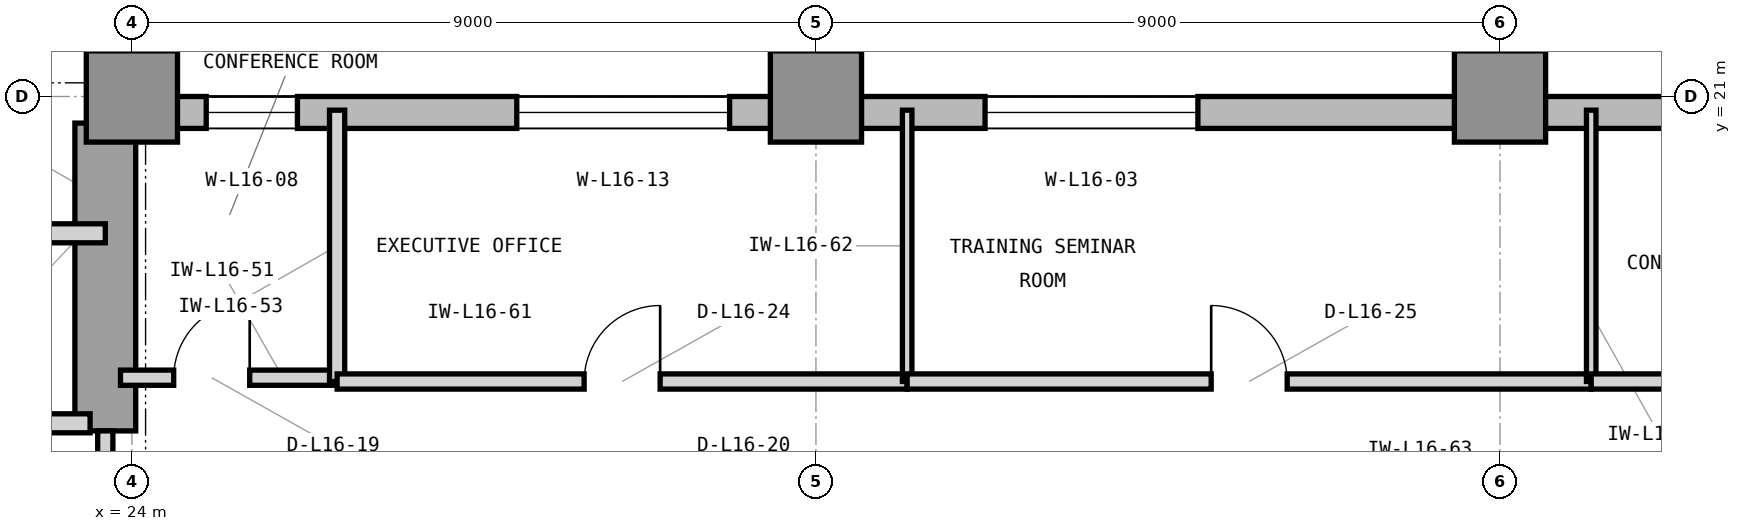
"""IFC4 building model, lengths in metres.
Left out: names, types, materials, properties, quantities, classifications, styles, units other than length and angle.
Written with IfcOpenShell. Run it as: python <this file> out.ifc"""

import sys

from ifc_helpers import new_model, si_unit, direction, frame, frame_2d, origin, origin_2d, place, context, subcontext, project, spatial, rectangle, extrude, element, fill, save


model = new_model("IFC4")
c1 = context("Model", 3, precision=1e-05, world=origin(), true_north=direction((0.0, 1.0)))
c2 = subcontext(c1, "Body", "Model", "MODEL_VIEW")
j1 = project(units=[si_unit("LENGTHUNIT", "METRE"), si_unit("PLANEANGLEUNIT", "RADIAN")], contexts=[c1])
p1 = place(None, origin())
s1 = spatial("IfcSite", under=j1, at=p1, CompositionType="ELEMENT")
p2 = place(p1, origin())
s2 = spatial("IfcBuilding", under=s1, at=p2, CompositionType="ELEMENT")
p3 = place(p2, frame((0.0, 0.0, 72.0)))
s3 = spatial("IfcBuildingStorey", under=s2, at=p3, CompositionType="ELEMENT", Elevation=72.0)
p4 = place(p3, frame((23.65, 16.6, 0.0), z_axis=(0.0, 0.0, 1.0), x_axis=(0.0, 1.0, 0.0)))
e1 = element("IfcWall", 1, at=p4, inside=s3, PredefinedType="SHEAR", context=c2, shape_type="SweptSolid", body=[
    extrude(rectangle(XDim=4.05, YDim=0.8, at=frame_2d((2.025, 0.0))), origin(), (0.0, 0.0, 1.0), 4.2),
])
for number, where, z_axis, x_axis in (
    (2, (24.0, 21.0, 0.0), (0.0, 0.0, 1.0), (1.0, 0.0, 0.0)),
    (3, (33.0, 21.0, 0.0), (0.0, 0.0, 1.0), (1.0, 0.0, 0.0)),
    (4, (42.0, 21.0, 0.0), (0.0, 0.0, 1.0), (1.0, 0.0, 0.0)),
):
    element("IfcColumn", number, at=place(p3, frame(where, z_axis=z_axis, x_axis=x_axis)), inside=s3, PredefinedType="COLUMN", context=c2, shape_type="SweptSolid", body=[
        extrude(rectangle(XDim=1.2, YDim=1.2, at=origin_2d()), origin(), (0.0, 0.0, 1.0), 4.2),
    ])
p5 = place(p3, frame((64.4, 20.79, 0.0), z_axis=(0.0, 0.0, 1.0), x_axis=(-1.0, 0.0, 0.0)))
e5 = element("IfcWall", 5, at=p5, inside=s3, PredefinedType="STANDARD", context=c2, shape_type="SweptSolid", body=[
    extrude(rectangle(XDim=40.4, YDim=0.42, at=frame_2d((20.2, 0.0))), origin(), (0.0, 0.0, 1.0), 3.98),
])
p6 = place(p5, frame((26.375, 0.0, 0.85)))
e6 = element("IfcOpeningElement", 6, at=p6, cuts=e5, PredefinedType="OPENING", context=c2, shape_type="SweptSolid", body=[
    extrude(rectangle(XDim=2.8, YDim=2.45, at=frame_2d((1.4, 1.225))), frame((0.0, 0.22, 0.0), z_axis=(0.0, -1.0, 0.0), x_axis=(1.0, 0.0, 0.0)), (0.0, 0.0, 1.0), 0.44),
])
p7 = place(p5, frame((38.222, 0.0, 0.85)))
e7 = element("IfcOpeningElement", 7, at=p7, cuts=e5, PredefinedType="OPENING", context=c2, shape_type="SweptSolid", body=[
    extrude(rectangle(XDim=1.2, YDim=2.45, at=frame_2d((0.6, 1.225))), frame((0.0, 0.22, 0.0), z_axis=(0.0, -1.0, 0.0), x_axis=(1.0, 0.0, 0.0)), (0.0, 0.0, 1.0), 0.44),
])
p8 = place(p5, frame((32.536, 0.0, 0.85)))
e8 = element("IfcOpeningElement", 8, at=p8, cuts=e5, PredefinedType="OPENING", context=c2, shape_type="SweptSolid", body=[
    extrude(rectangle(XDim=2.8, YDim=2.45, at=frame_2d((1.4, 1.225))), frame((0.0, 0.22, 0.0), z_axis=(0.0, -1.0, 0.0), x_axis=(1.0, 0.0, 0.0)), (0.0, 0.0, 1.0), 0.44),
])
p9 = place(p5, frame((17.386, 0.0, 0.85)))
e9 = element("IfcOpeningElement", 9, at=p9, cuts=e5, PredefinedType="OPENING", context=c2, shape_type="SweptSolid", body=[
    extrude(rectangle(XDim=2.8, YDim=2.45, at=frame_2d((1.4, 1.225))), frame((0.0, 0.22, 0.0), z_axis=(0.0, -1.0, 0.0), x_axis=(1.0, 0.0, 0.0)), (0.0, 0.0, 1.0), 0.44),
])
p10 = place(p3, frame((23.79, 21.0, 0.0), z_axis=(0.0, 0.0, 1.0), x_axis=(0.0, 1.0, 0.0)))
e10 = element("IfcWall", 10, at=p10, inside=s3, PredefinedType="STANDARD", context=c2, shape_type="SweptSolid", body=[
    extrude(rectangle(XDim=28.4, YDim=0.42, at=frame_2d((14.2, 0.0))), origin(), (0.0, 0.0, 1.0), 3.98),
])
p11 = place(p10, frame((10.433, 0.0, 0.85)))
e11 = element("IfcOpeningElement", 11, at=p11, cuts=e10, PredefinedType="OPENING", context=c2, shape_type="SweptSolid", body=[
    extrude(rectangle(XDim=2.8, YDim=2.45, at=frame_2d((1.4, 1.225))), frame((0.0, 0.22, 0.0), z_axis=(0.0, -1.0, 0.0), x_axis=(1.0, 0.0, 0.0)), (0.0, 0.0, 1.0), 0.44),
])
p12 = place(p10, frame((16.016, 0.0, 0.85)))
e12 = element("IfcOpeningElement", 12, at=p12, cuts=e10, PredefinedType="OPENING", context=c2, shape_type="SweptSolid", body=[
    extrude(rectangle(XDim=1.2, YDim=2.45, at=frame_2d((0.6, 1.225))), frame((0.0, 0.22, 0.0), z_axis=(0.0, -1.0, 0.0), x_axis=(1.0, 0.0, 0.0)), (0.0, 0.0, 1.0), 0.44),
])
p13 = place(p3, frame((21.05, 16.7, 0.0), z_axis=(0.0, 0.0, 1.0), x_axis=(1.0, 0.0, 0.0)))
e13 = element("IfcWall", 13, at=p13, inside=s3, PredefinedType="PARTITIONING", context=c2, shape_type="SweptSolid", body=[
    extrude(rectangle(XDim=2.4, YDim=0.25, at=frame_2d((1.2, 0.0))), origin(), (0.0, 0.0, 1.0), 3.426),
])
p14 = place(p3, frame((16.45, 19.2, 0.0), z_axis=(0.0, 0.0, 1.0), x_axis=(1.0, 0.0, 0.0)))
e14 = element("IfcWall", 14, at=p14, inside=s3, PredefinedType="PARTITIONING", context=c2, shape_type="SweptSolid", body=[
    extrude(rectangle(XDim=7.2, YDim=0.25, at=frame_2d((3.6, 0.0))), origin(), (0.0, 0.0, 1.0), 3.97),
])
p15 = place(p3, frame((23.65, 13.6, 0.0), z_axis=(0.0, 0.0, 1.0), x_axis=(0.0, 1.0, 0.0)))
e15 = element("IfcWall", 15, at=p15, inside=s3, PredefinedType="PARTITIONING", context=c2, shape_type="SweptSolid", body=[
    extrude(rectangle(XDim=3.0, YDim=0.2, at=frame_2d((1.5, 0.0))), origin(), (0.0, 0.0, 1.0), 3.97),
])
p16 = place(p15, frame((1.02, 0.0, 0.0)))
e16 = element("IfcOpeningElement", 16, at=p16, cuts=e15, PredefinedType="OPENING", context=c2, shape_type="SweptSolid", body=[
    extrude(rectangle(XDim=0.95, YDim=2.1, at=frame_2d((0.475, 1.05))), frame((0.0, 0.11, 0.0), z_axis=(0.0, -1.0, 0.0), x_axis=(1.0, 0.0, 0.0)), (0.0, 0.0, 1.0), 0.22),
])
p17 = place(p3, frame((23.85, 17.3, 0.0), z_axis=(0.0, 0.0, 1.0), x_axis=(1.0, 0.0, 0.0)))
e17 = element("IfcWall", 17, at=p17, inside=s3, PredefinedType="PARTITIONING", context=c2, shape_type="SweptSolid", body=[
    extrude(rectangle(XDim=2.85, YDim=0.2, at=frame_2d((1.425, 0.0))), origin(), (0.0, 0.0, 1.0), 3.97),
])
p18 = place(p17, frame((0.7, 0.0, 0.0)))
e18 = element("IfcOpeningElement", 18, at=p18, cuts=e17, PredefinedType="OPENING", context=c2, shape_type="SweptSolid", body=[
    extrude(rectangle(XDim=1.0, YDim=2.15, at=frame_2d((0.5, 1.075))), frame((0.0, 0.11, 0.0), z_axis=(0.0, -1.0, 0.0), x_axis=(1.0, 0.0, 0.0)), (0.0, 0.0, 1.0), 0.22),
])
p19 = place(p3, frame((26.7, 17.25, 0.0), z_axis=(0.0, 0.0, 1.0), x_axis=(0.0, 1.0, 0.0)))
e19 = element("IfcWall", 19, at=p19, inside=s3, PredefinedType="PARTITIONING", context=c2, shape_type="SweptSolid", body=[
    extrude(rectangle(XDim=3.57, YDim=0.2, at=frame_2d((1.785, 0.0))), origin(), (0.0, 0.0, 1.0), 3.97),
])
p20 = place(p3, frame((26.7, 17.25, 0.0), z_axis=(0.0, 0.0, 1.0), x_axis=(1.0, 0.0, 0.0)))
e20 = element("IfcWall", 20, at=p20, inside=s3, PredefinedType="PARTITIONING", context=c2, shape_type="SweptSolid", body=[
    extrude(rectangle(XDim=7.5, YDim=0.2, at=frame_2d((3.75, 0.0))), origin(), (0.0, 0.0, 1.0), 3.97),
])
p21 = place(p20, frame((3.25, 0.0, 0.0)))
e21 = element("IfcOpeningElement", 21, at=p21, cuts=e20, PredefinedType="OPENING", context=c2, shape_type="SweptSolid", body=[
    extrude(rectangle(XDim=1.0, YDim=2.15, at=frame_2d((0.5, 1.075))), frame((0.0, 0.11, 0.0), z_axis=(0.0, -1.0, 0.0), x_axis=(1.0, 0.0, 0.0)), (0.0, 0.0, 1.0), 0.22),
])
p22 = place(p3, frame((34.2, 17.25, 0.0), z_axis=(0.0, 0.0, 1.0), x_axis=(0.0, 1.0, 0.0)))
e22 = element("IfcWall", 22, at=p22, inside=s3, PredefinedType="PARTITIONING", context=c2, shape_type="SweptSolid", body=[
    extrude(rectangle(XDim=3.57, YDim=0.125, at=frame_2d((1.785, 0.0))), origin(), (0.0, 0.0, 1.0), 3.97),
])
p23 = place(p3, frame((34.2, 17.25, 0.0), z_axis=(0.0, 0.0, 1.0), x_axis=(1.0, 0.0, 0.0)))
e23 = element("IfcWall", 23, at=p23, inside=s3, PredefinedType="PARTITIONING", context=c2, shape_type="SweptSolid", body=[
    extrude(rectangle(XDim=9.0, YDim=0.2, at=frame_2d((4.5, 0.0))), origin(), (0.0, 0.0, 1.0), 3.97),
])
p24 = place(p23, frame((4.0, 0.0, 0.0)))
e24 = element("IfcOpeningElement", 24, at=p24, cuts=e23, PredefinedType="OPENING", context=c2, shape_type="SweptSolid", body=[
    extrude(rectangle(XDim=1.0, YDim=2.15, at=frame_2d((0.5, 1.075))), frame((0.0, 0.11, 0.0), z_axis=(0.0, -1.0, 0.0), x_axis=(1.0, 0.0, 0.0)), (0.0, 0.0, 1.0), 0.22),
])
p25 = place(p3, frame((43.2, 17.25, 0.0), z_axis=(0.0, 0.0, 1.0), x_axis=(0.0, 1.0, 0.0)))
e25 = element("IfcWall", 25, at=p25, inside=s3, PredefinedType="PARTITIONING", context=c2, shape_type="SweptSolid", body=[
    extrude(rectangle(XDim=3.57, YDim=0.125, at=frame_2d((1.785, 0.0))), origin(), (0.0, 0.0, 1.0), 3.97),
])
p26 = place(p3, frame((43.2, 17.25, 0.0), z_axis=(0.0, 0.0, 1.0), x_axis=(1.0, 0.0, 0.0)))
e26 = element("IfcWall", 26, at=p26, inside=s3, PredefinedType="PARTITIONING", context=c2, shape_type="SweptSolid", body=[
    extrude(rectangle(XDim=15.3, YDim=0.2, at=frame_2d((7.65, 0.0))), origin(), (0.0, 0.0, 1.0), 3.97),
])
p27 = place(p26, frame((6.9, 0.0, 0.0)))
e27 = element("IfcOpeningElement", 27, at=p27, cuts=e26, PredefinedType="OPENING", context=c2, shape_type="SweptSolid", body=[
    extrude(rectangle(XDim=1.5, YDim=2.3, at=frame_2d((0.75, 1.15))), frame((0.0, 0.11, 0.0), z_axis=(0.0, -1.0, 0.0), x_axis=(1.0, 0.0, 0.0)), (0.0, 0.0, 1.0), 0.22),
])
p28 = place(p6, origin())
e28 = element("IfcWindow", 28, at=p28, inside=s3, PartitioningType="SINGLE_PANEL", PredefinedType="WINDOW", context=c2, shape_type="SweptSolid", body=[
    extrude(rectangle(XDim=2.8, YDim=2.45, at=frame_2d((1.4, 1.225))), frame((0.0, 0.11, 0.0), z_axis=(0.0, -1.0, 0.0), x_axis=(1.0, 0.0, 0.0)), (0.0, 0.0, 1.0), 0.06),
])
fill(e6, e28)
p29 = place(p18, origin())
e29 = element("IfcDoor", 29, at=p29, inside=s3, OperationType="SINGLE_SWING_RIGHT", PredefinedType="DOOR", context=c2, shape_type="SweptSolid", body=[
    extrude(rectangle(XDim=1.0, YDim=2.15, at=frame_2d((0.5, 1.075))), frame((0.0, 0.025, 0.0), z_axis=(0.0, -1.0, 0.0), x_axis=(1.0, 0.0, 0.0)), (0.0, 0.0, 1.0), 0.05),
])
fill(e18, e29)
p30 = place(p21, origin())
e30 = element("IfcDoor", 30, at=p30, inside=s3, OperationType="SINGLE_SWING_RIGHT", PredefinedType="DOOR", context=c2, shape_type="SweptSolid", body=[
    extrude(rectangle(XDim=1.0, YDim=2.15, at=frame_2d((0.5, 1.075))), frame((0.0, 0.025, 0.0), z_axis=(0.0, -1.0, 0.0), x_axis=(1.0, 0.0, 0.0)), (0.0, 0.0, 1.0), 0.05),
])
fill(e21, e30)
p31 = place(p24, origin())
e31 = element("IfcDoor", 31, at=p31, inside=s3, OperationType="SINGLE_SWING_LEFT", PredefinedType="DOOR", context=c2, shape_type="SweptSolid", body=[
    extrude(rectangle(XDim=1.0, YDim=2.15, at=frame_2d((0.5, 1.075))), frame((0.0, 0.025, 0.0), z_axis=(0.0, -1.0, 0.0), x_axis=(1.0, 0.0, 0.0)), (0.0, 0.0, 1.0), 0.05),
])
fill(e24, e31)
p32 = place(p7, origin())
e32 = element("IfcWindow", 32, at=p32, inside=s3, PartitioningType="SINGLE_PANEL", PredefinedType="WINDOW", context=c2, shape_type="SweptSolid", body=[
    extrude(rectangle(XDim=1.2, YDim=2.45, at=frame_2d((0.6, 1.225))), frame((0.0, 0.11, 0.0), z_axis=(0.0, -1.0, 0.0), x_axis=(1.0, 0.0, 0.0)), (0.0, 0.0, 1.0), 0.06),
])
fill(e7, e32)
p33 = place(p8, origin())
e33 = element("IfcWindow", 33, at=p33, inside=s3, PartitioningType="SINGLE_PANEL", PredefinedType="WINDOW", context=c2, shape_type="SweptSolid", body=[
    extrude(rectangle(XDim=2.8, YDim=2.45, at=frame_2d((1.4, 1.225))), frame((0.0, 0.11, 0.0), z_axis=(0.0, -1.0, 0.0), x_axis=(1.0, 0.0, 0.0)), (0.0, 0.0, 1.0), 0.06),
])
fill(e8, e33)
save(model, sys.argv[1])
